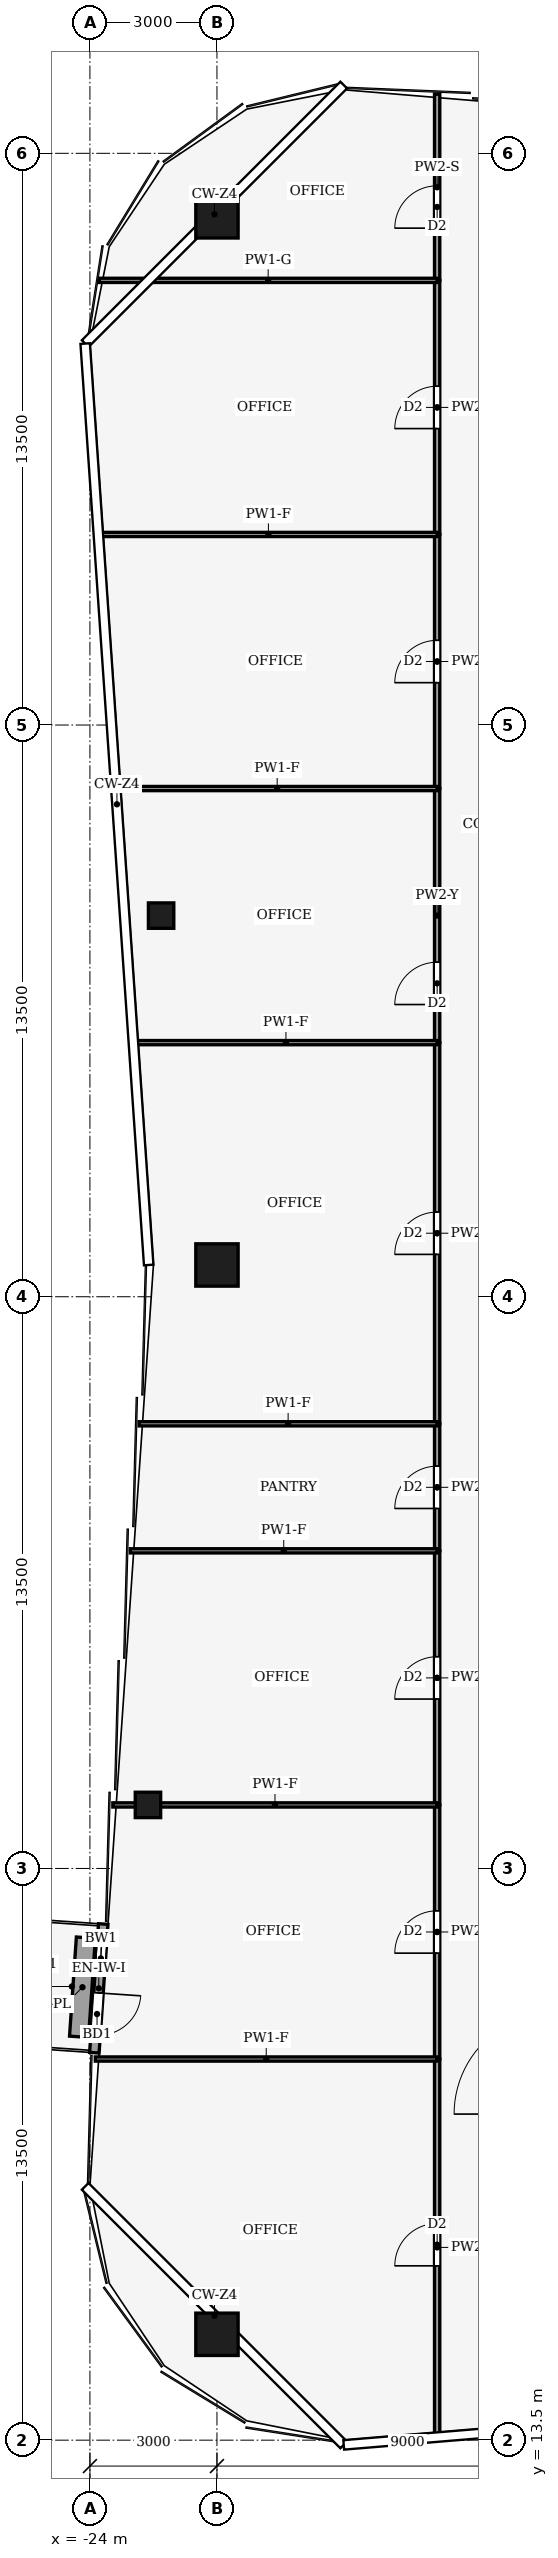
"""IFC4 building model, lengths in metres.
Left out: names, types, materials, properties, quantities, classifications, styles, units other than length and angle.
Written with IfcOpenShell. Run it as: python <this file> out.ifc"""

import sys

from ifc_helpers import new_model, si_unit, direction, frame, frame_2d, origin, origin_2d, place, context, subcontext, project, spatial, rectangle, hollow_rectangle, extrude, element, fill, save


model = new_model("IFC4")
c1 = context("Model", 3, precision=1e-05, world=origin(), true_north=direction((0.0, 1.0)))
c2 = subcontext(c1, "Body", "Model", "MODEL_VIEW")
j1 = project(units=[si_unit("LENGTHUNIT", "METRE"), si_unit("PLANEANGLEUNIT", "RADIAN")], contexts=[c1])
p1 = place(None, origin())
s1 = spatial("IfcSite", under=j1, at=p1, CompositionType="ELEMENT")
p2 = place(p1, origin())
s2 = spatial("IfcBuilding", under=s1, at=p2, CompositionType="ELEMENT")
p3 = place(p2, frame((0.0, 0.0, 270.0)))
s3 = spatial("IfcBuildingStorey", under=s2, at=p3, CompositionType="ELEMENT", Elevation=270.0)
for number, where, z_axis, x_axis in (
    (1, (-21.0, 66.0, 0.0), (0.0, 0.0, 1.0), (1.0, 0.0, 0.0)),
    (2, (-21.0, 16.0, 0.0), (0.0, 0.0, 1.0), (1.0, 0.0, 0.0)),
    (3, (-21.0, 41.25, 0.0), (0.0, 0.0, 1.0), (1.0, 0.0, 0.0)),
):
    element("IfcColumn", number, at=place(p3, frame(where, z_axis=z_axis, x_axis=x_axis)), inside=s3, PredefinedType="COLUMN", context=c2, shape_type="SweptSolid", body=[
        extrude(hollow_rectangle(XDim=1.0, YDim=1.0, WallThickness=0.045, at=origin_2d()), origin(), (0.0, 0.0, 1.0), 4.0),
    ])
for number, where, z_axis, x_axis in (
    (4, (-22.629, 28.5, 0.0), (0.0, 0.0, 1.0), (1.0, 0.0, 0.0)),
    (5, (-22.319, 49.5, 0.0), (0.0, 0.0, 1.0), (1.0, 0.0, 0.0)),
):
    element("IfcColumn", number, at=place(p3, frame(where, z_axis=z_axis, x_axis=x_axis)), inside=s3, PredefinedType="COLUMN", context=c2, shape_type="SweptSolid", body=[
        extrude(hollow_rectangle(XDim=0.6, YDim=0.6, WallThickness=0.025, at=origin_2d()), origin(), (0.0, 0.0, 1.0), 4.0),
    ])
p4 = place(p3, frame((-23.686, 25.688, 0.0), z_axis=(0.0, 0.0, 1.0), x_axis=(-0.06875808698, -0.99763336225, 0.0)))
e6 = element("IfcWall", 6, at=p4, inside=s3, PredefinedType="SOLIDWALL", context=c2, shape_type="SweptSolid", body=[
    extrude(rectangle(XDim=3.047, YDim=0.224, at=frame_2d((1.523, 0.0))), origin(), (0.0, 0.0, 1.0), 3.65),
])
p5 = place(p4, frame((1.631, 0.0, 0.0)))
e7 = element("IfcOpeningElement", 7, at=p5, cuts=e6, PredefinedType="OPENING", context=c2, shape_type="SweptSolid", body=[
    extrude(rectangle(XDim=1.0, YDim=2.1, at=frame_2d((0.5, 1.05))), frame((0.0, 0.122, 0.0), z_axis=(0.0, -1.0, 0.0), x_axis=(1.0, 0.0, 0.0)), (0.0, 0.0, 1.0), 0.244),
])
p6 = place(p4, frame((0.416, 0.0, 0.9)))
e8 = element("IfcOpeningElement", 8, at=p6, cuts=e6, PredefinedType="OPENING", context=c2, shape_type="SweptSolid", body=[
    extrude(rectangle(XDim=0.8, YDim=1.2, at=frame_2d((0.4, 0.6))), frame((0.0, 0.122, 0.0), z_axis=(0.0, -1.0, 0.0), x_axis=(1.0, 0.0, 0.0)), (0.0, 0.0, 1.0), 0.244),
])
p7 = place(p3, frame((-24.096, 25.365, 0.0), z_axis=(0.0, 0.0, 1.0), x_axis=(-0.06877709495, -0.997632052016, 0.0)))
e9 = element("IfcWall", 9, at=p7, inside=s3, PredefinedType="USERDEFINED", context=c2, shape_type="SweptSolid", body=[
    extrude(rectangle(XDim=2.346, YDim=0.45, at=frame_2d((1.173, 0.0))), origin(), (0.0, 0.0, 1.0), 0.4),
])
p8 = place(p3, frame((-15.8, 13.603, 0.0), z_axis=(0.0, 0.0, 1.0), x_axis=(0.0, 1.0, 0.0)))
e10 = element("IfcWall", 10, at=p8, inside=s3, PredefinedType="PARTITIONING", context=c2, shape_type="SweptSolid", body=[
    extrude(rectangle(XDim=8.897, YDim=0.125, at=frame_2d((4.448, 0.0))), origin(), (0.0, 0.0, 1.0), 3.04),
])
p9 = place(p8, frame((4.013, 0.0, 0.0)))
e11 = element("IfcOpeningElement", 11, at=p9, cuts=e10, PredefinedType="OPENING", context=c2, shape_type="SweptSolid", body=[
    extrude(rectangle(XDim=1.0, YDim=2.1, at=frame_2d((0.5, 1.05))), frame((0.0, 0.073, 0.0), z_axis=(0.0, -1.0, 0.0), x_axis=(1.0, 0.0, 0.0)), (0.0, 0.0, 1.0), 0.145),
])
p10 = place(p3, frame((-15.8, 22.5, 0.0), z_axis=(0.0, 0.0, 1.0), x_axis=(0.0, 1.0, 0.0)))
e12 = element("IfcWall", 12, at=p10, inside=s3, PredefinedType="PARTITIONING", context=c2, shape_type="SweptSolid", body=[
    extrude(rectangle(XDim=6.0, YDim=0.125, at=frame_2d((3.0, 0.0))), origin(), (0.0, 0.0, 1.0), 3.44),
])
p11 = place(p10, frame((2.5, 0.0, 0.0)))
e13 = element("IfcOpeningElement", 13, at=p11, cuts=e12, PredefinedType="OPENING", context=c2, shape_type="SweptSolid", body=[
    extrude(rectangle(XDim=1.0, YDim=2.1, at=frame_2d((0.5, 1.05))), frame((0.0, 0.073, 0.0), z_axis=(0.0, -1.0, 0.0), x_axis=(1.0, 0.0, 0.0)), (0.0, 0.0, 1.0), 0.145),
])
p12 = place(p3, frame((-15.8, 28.5, 0.0), z_axis=(0.0, 0.0, 1.0), x_axis=(0.0, 1.0, 0.0)))
e14 = element("IfcWall", 14, at=p12, inside=s3, PredefinedType="PARTITIONING", context=c2, shape_type="SweptSolid", body=[
    extrude(rectangle(XDim=6.0, YDim=0.125, at=frame_2d((3.0, 0.0))), origin(), (0.0, 0.0, 1.0), 3.48),
])
p13 = place(p12, frame((2.5, 0.0, 0.0)))
e15 = element("IfcOpeningElement", 15, at=p13, cuts=e14, PredefinedType="OPENING", context=c2, shape_type="SweptSolid", body=[
    extrude(rectangle(XDim=1.0, YDim=2.1, at=frame_2d((0.5, 1.05))), frame((0.0, 0.073, 0.0), z_axis=(0.0, -1.0, 0.0), x_axis=(1.0, 0.0, 0.0)), (0.0, 0.0, 1.0), 0.145),
])
p14 = place(p3, frame((-15.8, 34.5, 0.0), z_axis=(0.0, 0.0, 1.0), x_axis=(0.0, 1.0, 0.0)))
e16 = element("IfcWall", 16, at=p14, inside=s3, PredefinedType="PARTITIONING", context=c2, shape_type="SweptSolid", body=[
    extrude(rectangle(XDim=3.0, YDim=0.125, at=frame_2d((1.5, 0.0))), origin(), (0.0, 0.0, 1.0), 3.48),
])
p15 = place(p14, frame((1.0, 0.0, 0.0)))
e17 = element("IfcOpeningElement", 17, at=p15, cuts=e16, PredefinedType="OPENING", context=c2, shape_type="SweptSolid", body=[
    extrude(rectangle(XDim=1.0, YDim=2.1, at=frame_2d((0.5, 1.05))), frame((0.0, 0.073, 0.0), z_axis=(0.0, -1.0, 0.0), x_axis=(1.0, 0.0, 0.0)), (0.0, 0.0, 1.0), 0.145),
])
p16 = place(p3, frame((-15.8, 37.5, 0.0), z_axis=(0.0, 0.0, 1.0), x_axis=(0.0, 1.0, 0.0)))
e18 = element("IfcWall", 18, at=p16, inside=s3, PredefinedType="PARTITIONING", context=c2, shape_type="SweptSolid", body=[
    extrude(rectangle(XDim=9.0, YDim=0.125, at=frame_2d((4.5, 0.0))), origin(), (0.0, 0.0, 1.0), 3.14),
])
p17 = place(p16, frame((4.0, 0.0, 0.0)))
e19 = element("IfcOpeningElement", 19, at=p17, cuts=e18, PredefinedType="OPENING", context=c2, shape_type="SweptSolid", body=[
    extrude(rectangle(XDim=1.0, YDim=2.1, at=frame_2d((0.5, 1.05))), frame((0.0, 0.073, 0.0), z_axis=(0.0, -1.0, 0.0), x_axis=(1.0, 0.0, 0.0)), (0.0, 0.0, 1.0), 0.145),
])
p18 = place(p3, frame((-15.8, 46.5, 0.0), z_axis=(0.0, 0.0, 1.0), x_axis=(0.0, 1.0, 0.0)))
e20 = element("IfcWall", 20, at=p18, inside=s3, PredefinedType="PARTITIONING", context=c2, shape_type="SweptSolid", body=[
    extrude(rectangle(XDim=6.0, YDim=0.125, at=frame_2d((3.0, 0.0))), origin(), (0.0, 0.0, 1.0), 3.24),
])
p19 = place(p18, frame((0.9, 0.0, 0.0)))
e21 = element("IfcOpeningElement", 21, at=p19, cuts=e20, PredefinedType="OPENING", context=c2, shape_type="SweptSolid", body=[
    extrude(rectangle(XDim=1.0, YDim=2.1, at=frame_2d((0.5, 1.05))), frame((0.0, 0.073, 0.0), z_axis=(0.0, -1.0, 0.0), x_axis=(1.0, 0.0, 0.0)), (0.0, 0.0, 1.0), 0.145),
])
p20 = place(p3, frame((-15.8, 52.5, 0.0), z_axis=(0.0, 0.0, 1.0), x_axis=(0.0, 1.0, 0.0)))
e22 = element("IfcWall", 22, at=p20, inside=s3, PredefinedType="PARTITIONING", context=c2, shape_type="SweptSolid", body=[
    extrude(rectangle(XDim=6.0, YDim=0.125, at=frame_2d((3.0, 0.0))), origin(), (0.0, 0.0, 1.0), 3.87),
])
p21 = place(p20, frame((2.5, 0.0, 0.0)))
e23 = element("IfcOpeningElement", 23, at=p21, cuts=e22, PredefinedType="OPENING", context=c2, shape_type="SweptSolid", body=[
    extrude(rectangle(XDim=1.0, YDim=2.1, at=frame_2d((0.5, 1.05))), frame((0.0, 0.073, 0.0), z_axis=(0.0, -1.0, 0.0), x_axis=(1.0, 0.0, 0.0)), (0.0, 0.0, 1.0), 0.145),
])
p22 = place(p3, frame((-15.8, 58.5, 0.0), z_axis=(0.0, 0.0, 1.0), x_axis=(0.0, 1.0, 0.0)))
e24 = element("IfcWall", 24, at=p22, inside=s3, PredefinedType="PARTITIONING", context=c2, shape_type="SweptSolid", body=[
    extrude(rectangle(XDim=6.0, YDim=0.125, at=frame_2d((3.0, 0.0))), origin(), (0.0, 0.0, 1.0), 3.87),
])
p23 = place(p22, frame((2.5, 0.0, 0.0)))
e25 = element("IfcOpeningElement", 25, at=p23, cuts=e24, PredefinedType="OPENING", context=c2, shape_type="SweptSolid", body=[
    extrude(rectangle(XDim=1.0, YDim=2.1, at=frame_2d((0.5, 1.05))), frame((0.0, 0.073, 0.0), z_axis=(0.0, -1.0, 0.0), x_axis=(1.0, 0.0, 0.0)), (0.0, 0.0, 1.0), 0.145),
])
p24 = place(p3, frame((-15.8, 64.5, 0.0), z_axis=(0.0, 0.0, 1.0), x_axis=(0.0, 1.0, 0.0)))
e26 = element("IfcWall", 26, at=p24, inside=s3, PredefinedType="PARTITIONING", context=c2, shape_type="SweptSolid", body=[
    extrude(rectangle(XDim=4.397, YDim=0.125, at=frame_2d((2.198, 0.0))), origin(), (0.0, 0.0, 1.0), 3.04),
])
p25 = place(p24, frame((1.233, 0.0, 0.0)))
e27 = element("IfcOpeningElement", 27, at=p25, cuts=e26, PredefinedType="OPENING", context=c2, shape_type="SweptSolid", body=[
    extrude(rectangle(XDim=1.0, YDim=2.1, at=frame_2d((0.5, 1.05))), frame((0.0, 0.073, 0.0), z_axis=(0.0, -1.0, 0.0), x_axis=(1.0, 0.0, 0.0)), (0.0, 0.0, 1.0), 0.145),
])
p26 = place(p3, frame((-15.8, 22.5, 0.0), z_axis=(0.0, 0.0, 1.0), x_axis=(-1.0, 0.0, 0.0)))
e28 = element("IfcWall", 28, at=p26, inside=s3, PredefinedType="PARTITIONING", context=c2, shape_type="SweptSolid", body=[
    extrude(rectangle(XDim=8.073, YDim=0.1, at=frame_2d((4.037, 0.0))), origin(), (0.0, 0.0, 1.0), 3.04),
])
p27 = place(p3, frame((-15.8, 28.5, 0.0), z_axis=(0.0, 0.0, 1.0), x_axis=(-1.0, 0.0, 0.0)))
e29 = element("IfcWall", 29, at=p27, inside=s3, PredefinedType="PARTITIONING", context=c2, shape_type="SweptSolid", body=[
    extrude(rectangle(XDim=7.659, YDim=0.1, at=frame_2d((3.83, 0.0))), origin(), (0.0, 0.0, 1.0), 3.04),
])
p28 = place(p3, frame((-15.8, 34.5, 0.0), z_axis=(0.0, 0.0, 1.0), x_axis=(-1.0, 0.0, 0.0)))
e30 = element("IfcWall", 30, at=p28, inside=s3, PredefinedType="PARTITIONING", context=c2, shape_type="SweptSolid", body=[
    extrude(rectangle(XDim=7.245, YDim=0.1, at=frame_2d((3.623, 0.0))), origin(), (0.0, 0.0, 1.0), 3.04),
])
p29 = place(p3, frame((-15.8, 37.5, 0.0), z_axis=(0.0, 0.0, 1.0), x_axis=(-1.0, 0.0, 0.0)))
e31 = element("IfcWall", 31, at=p29, inside=s3, PredefinedType="PARTITIONING", context=c2, shape_type="SweptSolid", body=[
    extrude(rectangle(XDim=7.039, YDim=0.1, at=frame_2d((3.519, 0.0))), origin(), (0.0, 0.0, 1.0), 3.04),
])
p30 = place(p3, frame((-15.8, 46.5, 0.0), z_axis=(0.0, 0.0, 1.0), x_axis=(-1.0, 0.0, 0.0)))
e32 = element("IfcWall", 32, at=p30, inside=s3, PredefinedType="PARTITIONING", context=c2, shape_type="SweptSolid", body=[
    extrude(rectangle(XDim=7.142, YDim=0.1, at=frame_2d((3.571, 0.0))), origin(), (0.0, 0.0, 1.0), 3.04),
])
p31 = place(p3, frame((-15.8, 52.5, 0.0), z_axis=(0.0, 0.0, 1.0), x_axis=(-1.0, 0.0, 0.0)))
e33 = element("IfcWall", 33, at=p31, inside=s3, PredefinedType="PARTITIONING", context=c2, shape_type="SweptSolid", body=[
    extrude(rectangle(XDim=7.556, YDim=0.1, at=frame_2d((3.778, 0.0))), origin(), (0.0, 0.0, 1.0), 3.04),
])
p32 = place(p3, frame((-15.8, 58.5, 0.0), z_axis=(0.0, 0.0, 1.0), x_axis=(-1.0, 0.0, 0.0)))
e34 = element("IfcWall", 34, at=p32, inside=s3, PredefinedType="PARTITIONING", context=c2, shape_type="SweptSolid", body=[
    extrude(rectangle(XDim=7.97, YDim=0.1, at=frame_2d((3.985, 0.0))), origin(), (0.0, 0.0, 1.0), 3.04),
])
p33 = place(p3, frame((-15.8, 64.5, 0.0), z_axis=(0.0, 0.0, 1.0), x_axis=(-1.0, 0.0, 0.0)))
e35 = element("IfcWall", 35, at=p33, inside=s3, PredefinedType="PARTITIONING", context=c2, shape_type="SweptSolid", body=[
    extrude(rectangle(XDim=7.981, YDim=0.1, at=frame_2d((3.991, 0.0))), origin(), (0.0, 0.0, 1.0), 2.93),
])
p34 = place(p5, origin())
e36 = element("IfcDoor", 36, at=p34, inside=s3, OperationType="SINGLE_SWING_RIGHT", PredefinedType="DOOR", context=c2, shape_type="SweptSolid", body=[
    extrude(rectangle(XDim=1.0, YDim=2.1, at=frame_2d((0.5, 1.05))), frame((0.0, 0.025, 0.0), z_axis=(0.0, -1.0, 0.0), x_axis=(1.0, 0.0, 0.0)), (0.0, 0.0, 1.0), 0.05),
])
fill(e7, e36)
p35 = place(p6, origin())
e37 = element("IfcWindow", 37, at=p35, inside=s3, PartitioningType="SINGLE_PANEL", PredefinedType="WINDOW", context=c2, shape_type="SweptSolid", body=[
    extrude(rectangle(XDim=0.8, YDim=1.2, at=frame_2d((0.4, 0.6))), frame((0.0, 0.03, 0.0), z_axis=(0.0, -1.0, 0.0), x_axis=(1.0, 0.0, 0.0)), (0.0, 0.0, 1.0), 0.06),
])
fill(e8, e37)
p36 = place(p9, origin())
e38 = element("IfcDoor", 38, at=p36, inside=s3, OperationType="SINGLE_SWING_RIGHT", PredefinedType="DOOR", context=c2, shape_type="SweptSolid", body=[
    extrude(rectangle(XDim=1.0, YDim=2.1, at=frame_2d((0.5, 1.05))), frame((0.0, 0.025, 0.0), z_axis=(0.0, -1.0, 0.0), x_axis=(1.0, 0.0, 0.0)), (0.0, 0.0, 1.0), 0.05),
])
fill(e11, e38)
p37 = place(p11, origin())
e39 = element("IfcDoor", 39, at=p37, inside=s3, OperationType="SINGLE_SWING_RIGHT", PredefinedType="DOOR", context=c2, shape_type="SweptSolid", body=[
    extrude(rectangle(XDim=1.0, YDim=2.1, at=frame_2d((0.5, 1.05))), frame((0.0, 0.025, 0.0), z_axis=(0.0, -1.0, 0.0), x_axis=(1.0, 0.0, 0.0)), (0.0, 0.0, 1.0), 0.05),
])
fill(e13, e39)
p38 = place(p13, origin())
e40 = element("IfcDoor", 40, at=p38, inside=s3, OperationType="SINGLE_SWING_LEFT", PredefinedType="DOOR", context=c2, shape_type="SweptSolid", body=[
    extrude(rectangle(XDim=1.0, YDim=2.1, at=frame_2d((0.5, 1.05))), frame((0.0, 0.025, 0.0), z_axis=(0.0, -1.0, 0.0), x_axis=(1.0, 0.0, 0.0)), (0.0, 0.0, 1.0), 0.05),
])
fill(e15, e40)
p39 = place(p15, origin())
e41 = element("IfcDoor", 41, at=p39, inside=s3, OperationType="SINGLE_SWING_RIGHT", PredefinedType="DOOR", context=c2, shape_type="SweptSolid", body=[
    extrude(rectangle(XDim=1.0, YDim=2.1, at=frame_2d((0.5, 1.05))), frame((0.0, 0.025, 0.0), z_axis=(0.0, -1.0, 0.0), x_axis=(1.0, 0.0, 0.0)), (0.0, 0.0, 1.0), 0.05),
])
fill(e17, e41)
p40 = place(p17, origin())
e42 = element("IfcDoor", 42, at=p40, inside=s3, OperationType="SINGLE_SWING_LEFT", PredefinedType="DOOR", context=c2, shape_type="SweptSolid", body=[
    extrude(rectangle(XDim=1.0, YDim=2.1, at=frame_2d((0.5, 1.05))), frame((0.0, 0.025, 0.0), z_axis=(0.0, -1.0, 0.0), x_axis=(1.0, 0.0, 0.0)), (0.0, 0.0, 1.0), 0.05),
])
fill(e19, e42)
p41 = place(p19, origin())
e43 = element("IfcDoor", 43, at=p41, inside=s3, OperationType="SINGLE_SWING_LEFT", PredefinedType="DOOR", context=c2, shape_type="SweptSolid", body=[
    extrude(rectangle(XDim=1.0, YDim=2.1, at=frame_2d((0.5, 1.05))), frame((0.0, 0.025, 0.0), z_axis=(0.0, -1.0, 0.0), x_axis=(1.0, 0.0, 0.0)), (0.0, 0.0, 1.0), 0.05),
])
fill(e21, e43)
p42 = place(p21, origin())
e44 = element("IfcDoor", 44, at=p42, inside=s3, OperationType="SINGLE_SWING_LEFT", PredefinedType="DOOR", context=c2, shape_type="SweptSolid", body=[
    extrude(rectangle(XDim=1.0, YDim=2.1, at=frame_2d((0.5, 1.05))), frame((0.0, 0.025, 0.0), z_axis=(0.0, -1.0, 0.0), x_axis=(1.0, 0.0, 0.0)), (0.0, 0.0, 1.0), 0.05),
])
fill(e23, e44)
p43 = place(p23, origin())
e45 = element("IfcDoor", 45, at=p43, inside=s3, OperationType="SINGLE_SWING_RIGHT", PredefinedType="DOOR", context=c2, shape_type="SweptSolid", body=[
    extrude(rectangle(XDim=1.0, YDim=2.1, at=frame_2d((0.5, 1.05))), frame((0.0, 0.025, 0.0), z_axis=(0.0, -1.0, 0.0), x_axis=(1.0, 0.0, 0.0)), (0.0, 0.0, 1.0), 0.05),
])
fill(e25, e45)
p44 = place(p25, origin())
e46 = element("IfcDoor", 46, at=p44, inside=s3, OperationType="SINGLE_SWING_LEFT", PredefinedType="DOOR", context=c2, shape_type="SweptSolid", body=[
    extrude(rectangle(XDim=1.0, YDim=2.1, at=frame_2d((0.5, 1.05))), frame((0.0, 0.025, 0.0), z_axis=(0.0, -1.0, 0.0), x_axis=(1.0, 0.0, 0.0)), (0.0, 0.0, 1.0), 0.05),
])
fill(e27, e46)
save(model, sys.argv[1])
